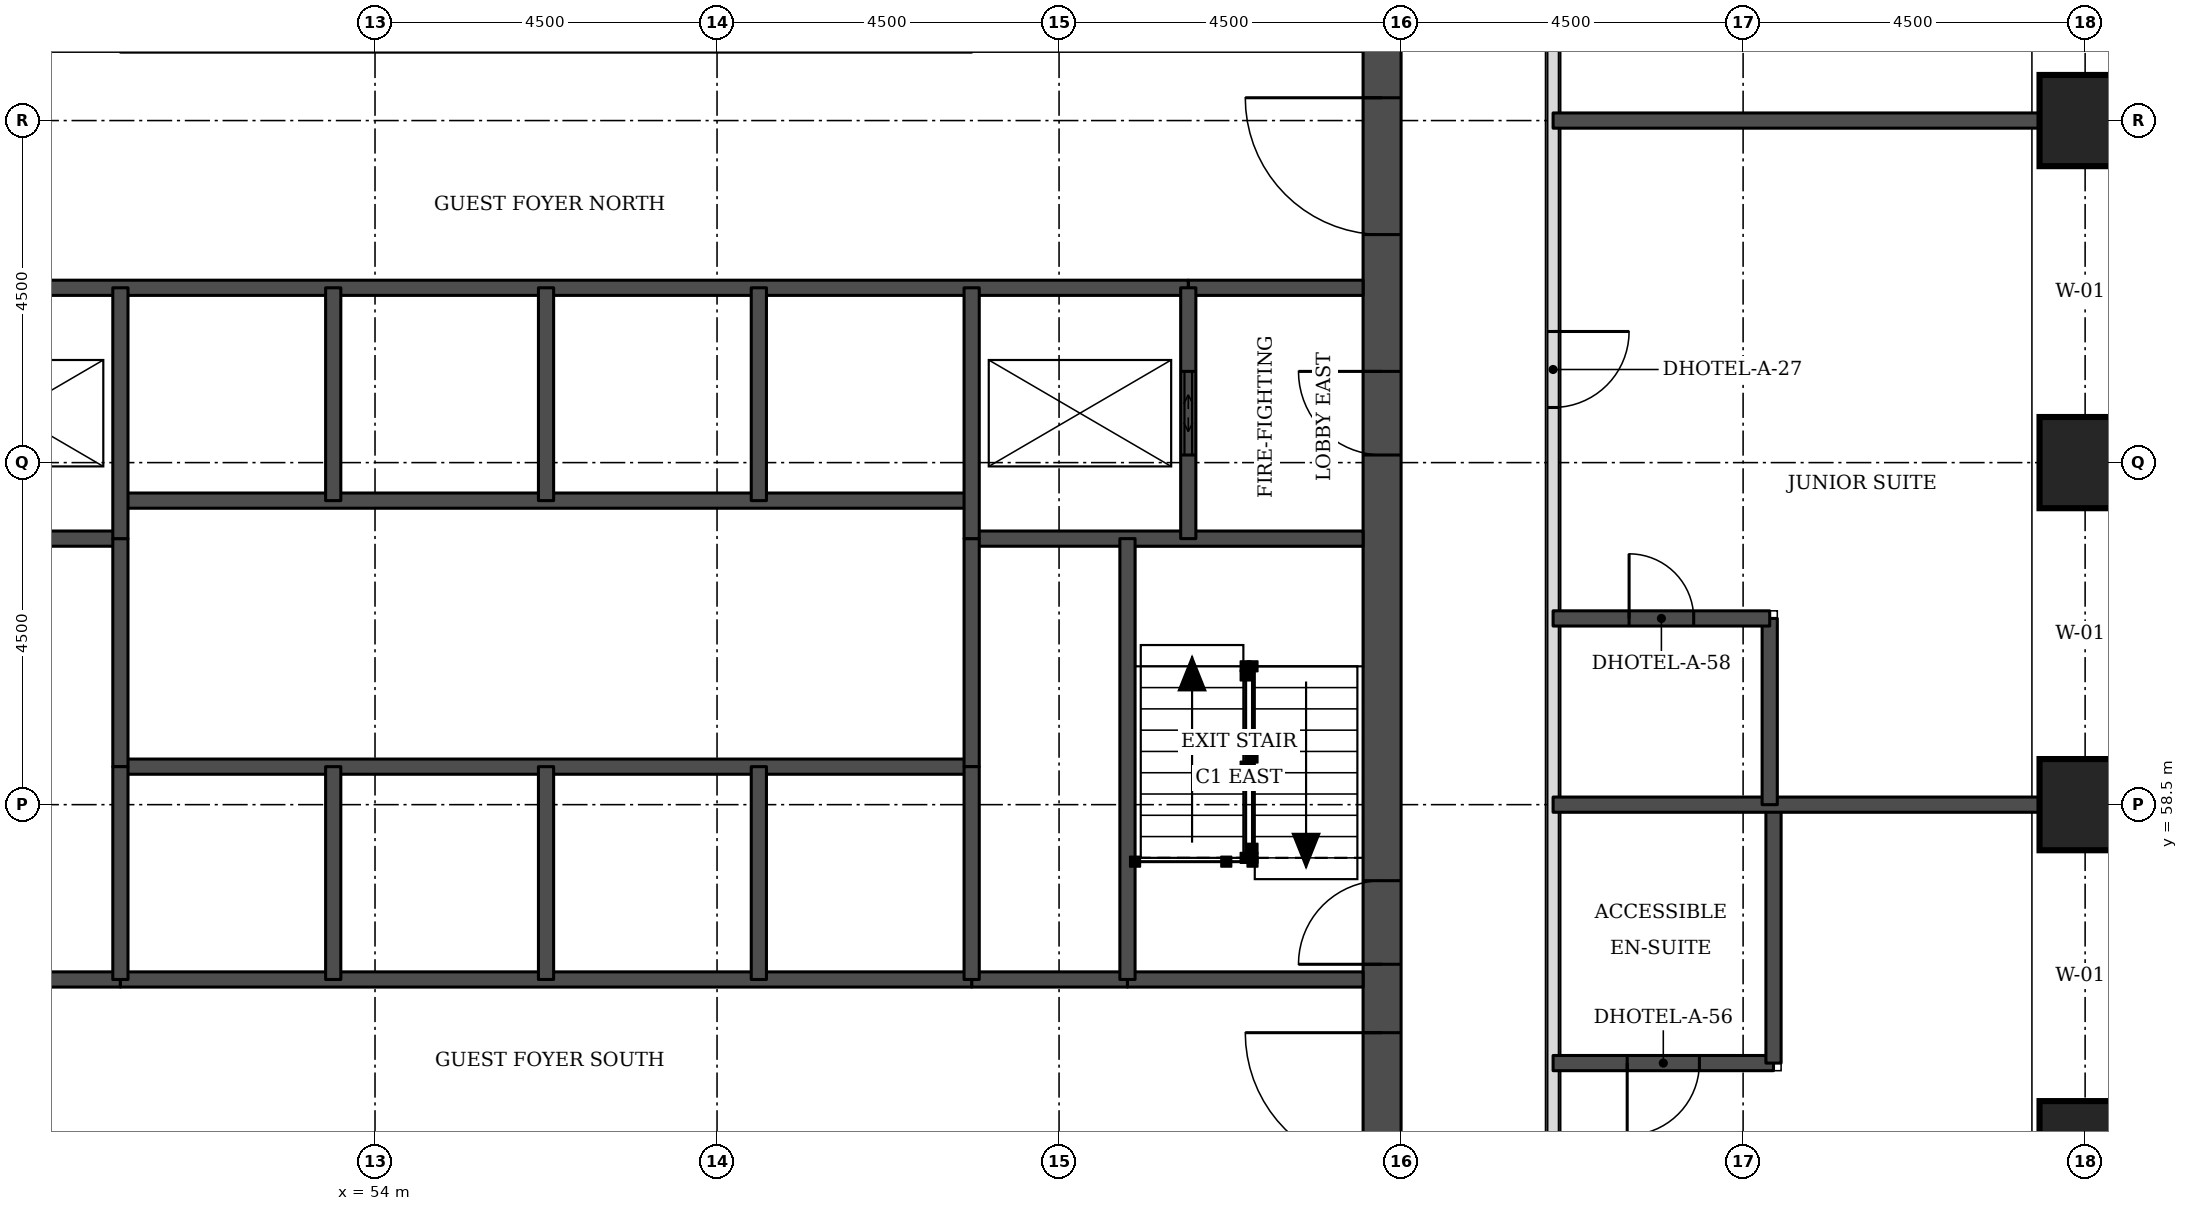
"""IFC4 building model, lengths in metres.
Left out: names, types, materials, properties, quantities, classifications, styles, units other than length and angle.
Written with IfcOpenShell. Run it as: python <this file> out.ifc"""

import sys

from ifc_helpers import new_model, si_unit, direction, frame, frame_2d, origin, origin_2d, place, context, subcontext, project, spatial, rectangle, extrude, element, fill, save


model = new_model("IFC4")
c1 = context("Model", 3, precision=1e-05, world=origin(), true_north=direction((0.0, 1.0)))
c2 = subcontext(c1, "Body", "Model", "MODEL_VIEW")
j1 = project(units=[si_unit("LENGTHUNIT", "METRE"), si_unit("PLANEANGLEUNIT", "RADIAN")], contexts=[c1])
p1 = place(None, origin())
s1 = spatial("IfcSite", under=j1, at=p1, CompositionType="ELEMENT")
p2 = place(p1, origin())
s2 = spatial("IfcBuilding", under=s1, at=p2, CompositionType="ELEMENT")
p3 = place(p2, frame((0.0, 0.0, 49.5)))
s3 = spatial("IfcBuildingStorey", under=s2, at=p3, CompositionType="ELEMENT", Elevation=49.5)
for number, where, z_axis, x_axis in (
    (1, (76.5, 54.0, 0.0), (0.0, 0.0, 1.0), (1.0, 0.0, 0.0)),
    (2, (76.5, 58.5, 0.0), (0.0, 0.0, 1.0), (1.0, 0.0, 0.0)),
    (3, (76.5, 63.0, 0.0), (0.0, 0.0, 1.0), (1.0, 0.0, 0.0)),
    (4, (76.5, 67.5, 0.0), (0.0, 0.0, 1.0), (1.0, 0.0, 0.0)),
):
    element("IfcColumn", number, at=place(p3, frame(where, z_axis=z_axis, x_axis=x_axis)), inside=s3, PredefinedType="COLUMN", context=c2, shape_type="SweptSolid", body=[
        extrude(rectangle(XDim=1.2, YDim=1.2, at=origin_2d()), origin(), (0.0, 0.0, 1.0), 3.3),
    ])
p4 = place(p3, frame((67.25, 49.5, 0.0), z_axis=(0.0, 0.0, 1.0), x_axis=(0.0, 1.0, 0.0)))
e5 = element("IfcWall", 5, at=p4, inside=s3, PredefinedType="SHEAR", context=c2, shape_type="SweptSolid", body=[
    extrude(rectangle(XDim=22.5, YDim=0.5, at=frame_2d((11.25, 0.0))), origin(), (0.0, 0.0, 1.0), 3.3),
])
p5 = place(p4, frame((4.2, 0.0, 0.0)))
e6 = element("IfcOpeningElement", 6, at=p5, cuts=e5, PredefinedType="OPENING", context=c2, shape_type="SweptSolid", body=[
    extrude(rectangle(XDim=1.8, YDim=2.1, at=frame_2d((0.9, 1.05))), frame((0.0, 0.26, 0.0), z_axis=(0.0, -1.0, 0.0), x_axis=(1.0, 0.0, 0.0)), (0.0, 0.0, 1.0), 0.52),
])
p6 = place(p4, frame((6.9, 0.0, 0.0)))
e7 = element("IfcOpeningElement", 7, at=p6, cuts=e5, PredefinedType="OPENING", context=c2, shape_type="SweptSolid", body=[
    extrude(rectangle(XDim=1.1, YDim=2.1, at=frame_2d((0.55, 1.05))), frame((0.0, 0.26, 0.0), z_axis=(0.0, -1.0, 0.0), x_axis=(1.0, 0.0, 0.0)), (0.0, 0.0, 1.0), 0.52),
])
p7 = place(p4, frame((13.6, 0.0, 0.0)))
e8 = element("IfcOpeningElement", 8, at=p7, cuts=e5, PredefinedType="OPENING", context=c2, shape_type="SweptSolid", body=[
    extrude(rectangle(XDim=1.1, YDim=2.1, at=frame_2d((0.55, 1.05))), frame((0.0, 0.26, 0.0), z_axis=(0.0, -1.0, 0.0), x_axis=(1.0, 0.0, 0.0)), (0.0, 0.0, 1.0), 0.52),
])
p8 = place(p4, frame((16.5, 0.0, 0.0)))
e9 = element("IfcOpeningElement", 9, at=p8, cuts=e5, PredefinedType="OPENING", context=c2, shape_type="SweptSolid", body=[
    extrude(rectangle(XDim=1.8, YDim=2.1, at=frame_2d((0.9, 1.05))), frame((0.0, 0.26, 0.0), z_axis=(0.0, -1.0, 0.0), x_axis=(1.0, 0.0, 0.0)), (0.0, 0.0, 1.0), 0.52),
])
p9 = place(p3, frame((69.5, 47.5, 0.0), z_axis=(0.0, 0.0, 1.0), x_axis=(0.0, 1.0, 0.0)))
e10 = element("IfcWall", 10, at=p9, inside=s3, PredefinedType="PARTITIONING", context=c2, shape_type="SweptSolid", body=[
    extrude(rectangle(XDim=26.5, YDim=0.15, at=frame_2d((13.25, 0.0))), origin(), (0.0, 0.0, 1.0), 3.08),
])
p10 = place(p9, frame((22.525, 0.0, 0.0)))
e11 = element("IfcOpeningElement", 11, at=p10, cuts=e10, PredefinedType="OPENING", context=c2, shape_type="SweptSolid", body=[
    extrude(rectangle(XDim=1.0, YDim=2.1, at=frame_2d((0.5, 1.05))), frame((0.0, 0.085, 0.0), z_axis=(0.0, -1.0, 0.0), x_axis=(1.0, 0.0, 0.0)), (0.0, 0.0, 1.0), 0.17),
])
p11 = place(p9, frame((16.225, 0.0, 0.0)))
e12 = element("IfcOpeningElement", 12, at=p11, cuts=e10, PredefinedType="OPENING", context=c2, shape_type="SweptSolid", body=[
    extrude(rectangle(XDim=1.0, YDim=2.1, at=frame_2d((0.5, 1.05))), frame((0.0, 0.085, 0.0), z_axis=(0.0, -1.0, 0.0), x_axis=(1.0, 0.0, 0.0)), (0.0, 0.0, 1.0), 0.17),
])
p12 = place(p9, frame((4.25, 0.0, 0.0)))
e13 = element("IfcOpeningElement", 13, at=p12, cuts=e10, PredefinedType="OPENING", context=c2, shape_type="SweptSolid", body=[
    extrude(rectangle(XDim=1.1, YDim=2.1, at=frame_2d((0.55, 1.05))), frame((0.0, 0.085, 0.0), z_axis=(0.0, -1.0, 0.0), x_axis=(1.0, 0.0, 0.0)), (0.0, 0.0, 1.0), 0.17),
])
p13 = place(p9, frame((0.447, 0.0, 0.0)))
e14 = element("IfcOpeningElement", 14, at=p13, cuts=e10, PredefinedType="OPENING", context=c2, shape_type="SweptSolid", body=[
    extrude(rectangle(XDim=1.0, YDim=2.1, at=frame_2d((0.5, 1.05))), frame((0.0, 0.085, 0.0), z_axis=(0.0, -1.0, 0.0), x_axis=(1.0, 0.0, 0.0)), (0.0, 0.0, 1.0), 0.17),
])
p14 = place(p3, frame((69.5, 55.1, 0.0), z_axis=(0.0, 0.0, 1.0), x_axis=(1.0, 0.0, 0.0)))
e15 = element("IfcWall", 15, at=p14, inside=s3, PredefinedType="SOLIDWALL", context=c2, shape_type="SweptSolid", body=[
    extrude(rectangle(XDim=2.9, YDim=0.2, at=frame_2d((1.45, 0.0))), origin(), (0.0, 0.0, 1.0), 3.08),
])
p15 = place(p14, frame((0.975, 0.0, 0.0)))
e16 = element("IfcOpeningElement", 16, at=p15, cuts=e15, PredefinedType="OPENING", context=c2, shape_type="SweptSolid", body=[
    extrude(rectangle(XDim=0.95, YDim=2.1, at=frame_2d((0.475, 1.05))), frame((0.0, 0.11, 0.0), z_axis=(0.0, -1.0, 0.0), x_axis=(1.0, 0.0, 0.0)), (0.0, 0.0, 1.0), 0.22),
])
p16 = place(p3, frame((72.4, 55.1, 0.0), z_axis=(0.0, 0.0, 1.0), x_axis=(0.0, 1.0, 0.0)))
e17 = element("IfcWall", 17, at=p16, inside=s3, PredefinedType="SOLIDWALL", context=c2, shape_type="SweptSolid", body=[
    extrude(rectangle(XDim=3.4, YDim=0.2, at=frame_2d((1.7, 0.0))), origin(), (0.0, 0.0, 1.0), 3.08),
])
p17 = place(p3, frame((69.5, 58.5, 0.0), z_axis=(0.0, 0.0, 1.0), x_axis=(1.0, 0.0, 0.0)))
e18 = element("IfcWall", 18, at=p17, inside=s3, PredefinedType="SOLIDWALL", context=c2, shape_type="SweptSolid", body=[
    extrude(rectangle(XDim=6.4, YDim=0.2, at=frame_2d((3.2, 0.0))), origin(), (0.0, 0.0, 1.0), 3.08),
])
p18 = place(p3, frame((72.35, 58.5, 0.0), z_axis=(0.0, 0.0, 1.0), x_axis=(0.0, 1.0, 0.0)))
e19 = element("IfcWall", 19, at=p18, inside=s3, PredefinedType="SOLIDWALL", context=c2, shape_type="SweptSolid", body=[
    extrude(rectangle(XDim=2.45, YDim=0.2, at=frame_2d((1.225, 0.0))), origin(), (0.0, 0.0, 1.0), 3.08),
])
p19 = place(p3, frame((69.5, 60.95, 0.0), z_axis=(0.0, 0.0, 1.0), x_axis=(1.0, 0.0, 0.0)))
e20 = element("IfcWall", 20, at=p19, inside=s3, PredefinedType="SOLIDWALL", context=c2, shape_type="SweptSolid", body=[
    extrude(rectangle(XDim=2.85, YDim=0.2, at=frame_2d((1.425, 0.0))), origin(), (0.0, 0.0, 1.0), 3.08),
])
p20 = place(p19, frame((1.0, 0.0, 0.0)))
e21 = element("IfcOpeningElement", 21, at=p20, cuts=e20, PredefinedType="OPENING", context=c2, shape_type="SweptSolid", body=[
    extrude(rectangle(XDim=0.85, YDim=2.1, at=frame_2d((0.425, 1.05))), frame((0.0, 0.11, 0.0), z_axis=(0.0, -1.0, 0.0), x_axis=(1.0, 0.0, 0.0)), (0.0, 0.0, 1.0), 0.22),
])
p21 = place(p3, frame((69.5, 67.5, 0.0), z_axis=(0.0, 0.0, 1.0), x_axis=(1.0, 0.0, 0.0)))
e22 = element("IfcWall", 22, at=p21, inside=s3, PredefinedType="SOLIDWALL", context=c2, shape_type="SweptSolid", body=[
    extrude(rectangle(XDim=6.4, YDim=0.2, at=frame_2d((3.2, 0.0))), origin(), (0.0, 0.0, 1.0), 3.08),
])
for number, where, z_axis, x_axis in (
    (23, (48.6, 56.2, 0.0), (0.0, 0.0, 1.0), (1.0, 0.0, 0.0)),
    (24, (61.85, 56.2, 0.0), (0.0, 0.0, 1.0), (1.0, 0.0, 0.0)),
):
    element("IfcWall", number, at=place(p3, frame(where, z_axis=z_axis, x_axis=x_axis)), inside=s3, PredefinedType="SOLIDWALL", context=c2, shape_type="SweptSolid", body=[
        extrude(rectangle(XDim=2.05, YDim=0.2, at=frame_2d((1.025, 0.0))), origin(), (0.0, 0.0, 1.0), 3.08),
    ])
p22 = place(p3, frame((50.65, 56.2, 0.0), z_axis=(0.0, 0.0, 1.0), x_axis=(1.0, 0.0, 0.0)))
e25 = element("IfcWall", 25, at=p22, inside=s3, PredefinedType="SOLIDWALL", context=c2, shape_type="SweptSolid", body=[
    extrude(rectangle(XDim=11.2, YDim=0.2, at=frame_2d((5.6, 0.0))), origin(), (0.0, 0.0, 1.0), 3.08),
])
p23 = place(p3, frame((63.9, 56.2, 0.0), z_axis=(0.0, 0.0, 1.0), x_axis=(1.0, 0.0, 0.0)))
e26 = element("IfcWall", 26, at=p23, inside=s3, PredefinedType="SOLIDWALL", context=c2, shape_type="SweptSolid", body=[
    extrude(rectangle(XDim=3.1, YDim=0.2, at=frame_2d((1.55, 0.0))), origin(), (0.0, 0.0, 1.0), 3.08),
])
p24 = place(p3, frame((50.65, 59.0, 0.0), z_axis=(0.0, 0.0, 1.0), x_axis=(1.0, 0.0, 0.0)))
e27 = element("IfcWall", 27, at=p24, inside=s3, PredefinedType="SOLIDWALL", context=c2, shape_type="SweptSolid", body=[
    extrude(rectangle(XDim=11.2, YDim=0.2, at=frame_2d((5.6, 0.0))), origin(), (0.0, 0.0, 1.0), 3.3),
])
for number, where, z_axis, x_axis in (
    (28, (45.5, 62.0, 0.0), (0.0, 0.0, 1.0), (1.0, 0.0, 0.0)),
    (29, (61.85, 62.0, 0.0), (0.0, 0.0, 1.0), (1.0, 0.0, 0.0)),
):
    element("IfcWall", number, at=place(p3, frame(where, z_axis=z_axis, x_axis=x_axis)), inside=s3, PredefinedType="SOLIDWALL", context=c2, shape_type="SweptSolid", body=[
        extrude(rectangle(XDim=5.15, YDim=0.2, at=frame_2d((2.575, 0.0))), origin(), (0.0, 0.0, 1.0), 3.08),
    ])
p25 = place(p3, frame((50.65, 62.5, 0.0), z_axis=(0.0, 0.0, 1.0), x_axis=(1.0, 0.0, 0.0)))
e30 = element("IfcWall", 30, at=p25, inside=s3, PredefinedType="SOLIDWALL", context=c2, shape_type="SweptSolid", body=[
    extrude(rectangle(XDim=11.2, YDim=0.2, at=frame_2d((5.6, 0.0))), origin(), (0.0, 0.0, 1.0), 3.3),
])
p26 = place(p3, frame((64.7, 65.3, 0.0), z_axis=(0.0, 0.0, 1.0), x_axis=(1.0, 0.0, 0.0)))
e31 = element("IfcWall", 31, at=p26, inside=s3, PredefinedType="SOLIDWALL", context=c2, shape_type="SweptSolid", body=[
    extrude(rectangle(XDim=2.3, YDim=0.2, at=frame_2d((1.15, 0.0))), origin(), (0.0, 0.0, 1.0), 3.08),
])
p27 = place(p3, frame((47.8, 65.3, 0.0), z_axis=(0.0, 0.0, 1.0), x_axis=(1.0, 0.0, 0.0)))
e32 = element("IfcWall", 32, at=p27, inside=s3, PredefinedType="SOLIDWALL", context=c2, shape_type="SweptSolid", body=[
    extrude(rectangle(XDim=16.9, YDim=0.2, at=frame_2d((8.45, 0.0))), origin(), (0.0, 0.0, 1.0), 3.08),
])
p28 = place(p3, frame((50.65, 59.0, 0.0), z_axis=(0.0, 0.0, 1.0), x_axis=(0.0, 1.0, 0.0)))
e33 = element("IfcWall", 33, at=p28, inside=s3, PredefinedType="SOLIDWALL", context=c2, shape_type="SweptSolid", body=[
    extrude(rectangle(XDim=3.0, YDim=0.2, at=frame_2d((1.5, 0.0))), origin(), (0.0, 0.0, 1.0), 3.3),
])
p29 = place(p3, frame((50.65, 56.2, 0.0), z_axis=(0.0, 0.0, 1.0), x_axis=(0.0, 1.0, 0.0)))
e34 = element("IfcWall", 34, at=p29, inside=s3, PredefinedType="SOLIDWALL", context=c2, shape_type="SweptSolid", body=[
    extrude(rectangle(XDim=2.8, YDim=0.2, at=frame_2d((1.4, 0.0))), origin(), (0.0, 0.0, 1.0), 3.08),
])
p30 = place(p3, frame((50.65, 62.0, 0.0), z_axis=(0.0, 0.0, 1.0), x_axis=(0.0, 1.0, 0.0)))
e35 = element("IfcWall", 35, at=p30, inside=s3, PredefinedType="SOLIDWALL", context=c2, shape_type="SweptSolid", body=[
    extrude(rectangle(XDim=3.3, YDim=0.2, at=frame_2d((1.65, 0.0))), origin(), (0.0, 0.0, 1.0), 3.08),
])
for number, where, z_axis, x_axis in (
    (36, (53.45, 56.2, 0.0), (0.0, 0.0, 1.0), (0.0, 1.0, 0.0)),
    (37, (53.45, 62.5, 0.0), (0.0, 0.0, 1.0), (0.0, 1.0, 0.0)),
    (38, (56.25, 56.2, 0.0), (0.0, 0.0, 1.0), (0.0, 1.0, 0.0)),
    (39, (56.25, 62.5, 0.0), (0.0, 0.0, 1.0), (0.0, 1.0, 0.0)),
    (40, (59.05, 56.2, 0.0), (0.0, 0.0, 1.0), (0.0, 1.0, 0.0)),
    (41, (59.05, 62.5, 0.0), (0.0, 0.0, 1.0), (0.0, 1.0, 0.0)),
):
    element("IfcWall", number, at=place(p3, frame(where, z_axis=z_axis, x_axis=x_axis)), inside=s3, PredefinedType="SOLIDWALL", context=c2, shape_type="SweptSolid", body=[
        extrude(rectangle(XDim=2.8, YDim=0.2, at=frame_2d((1.4, 0.0))), origin(), (0.0, 0.0, 1.0), 3.08),
    ])
p31 = place(p3, frame((61.85, 59.0, 0.0), z_axis=(0.0, 0.0, 1.0), x_axis=(0.0, 1.0, 0.0)))
e42 = element("IfcWall", 42, at=p31, inside=s3, PredefinedType="SOLIDWALL", context=c2, shape_type="SweptSolid", body=[
    extrude(rectangle(XDim=3.0, YDim=0.2, at=frame_2d((1.5, 0.0))), origin(), (0.0, 0.0, 1.0), 3.3),
])
p32 = place(p3, frame((61.85, 56.2, 0.0), z_axis=(0.0, 0.0, 1.0), x_axis=(0.0, 1.0, 0.0)))
e43 = element("IfcWall", 43, at=p32, inside=s3, PredefinedType="SOLIDWALL", context=c2, shape_type="SweptSolid", body=[
    extrude(rectangle(XDim=2.8, YDim=0.2, at=frame_2d((1.4, 0.0))), origin(), (0.0, 0.0, 1.0), 3.08),
])
p33 = place(p3, frame((61.85, 62.0, 0.0), z_axis=(0.0, 0.0, 1.0), x_axis=(0.0, 1.0, 0.0)))
e44 = element("IfcWall", 44, at=p33, inside=s3, PredefinedType="SOLIDWALL", context=c2, shape_type="SweptSolid", body=[
    extrude(rectangle(XDim=3.3, YDim=0.2, at=frame_2d((1.65, 0.0))), origin(), (0.0, 0.0, 1.0), 3.08),
])
p34 = place(p3, frame((63.9, 56.2, 0.0), z_axis=(0.0, 0.0, 1.0), x_axis=(0.0, 1.0, 0.0)))
e45 = element("IfcWall", 45, at=p34, inside=s3, PredefinedType="SOLIDWALL", context=c2, shape_type="SweptSolid", body=[
    extrude(rectangle(XDim=5.8, YDim=0.2, at=frame_2d((2.9, 0.0))), origin(), (0.0, 0.0, 1.0), 3.08),
])
p35 = place(p3, frame((64.7, 62.0, 0.0), z_axis=(0.0, 0.0, 1.0), x_axis=(0.0, 1.0, 0.0)))
e46 = element("IfcWall", 46, at=p35, inside=s3, PredefinedType="SOLIDWALL", context=c2, shape_type="SweptSolid", body=[
    extrude(rectangle(XDim=3.3, YDim=0.2, at=frame_2d((1.65, 0.0))), origin(), (0.0, 0.0, 1.0), 3.08),
])
p36 = place(p35, frame((1.1, 0.0, 0.0)))
e47 = element("IfcOpeningElement", 47, at=p36, cuts=e46, PredefinedType="OPENING", context=c2, shape_type="SweptSolid", body=[
    extrude(rectangle(XDim=1.1, YDim=2.1, at=frame_2d((0.55, 1.05))), frame((0.0, 0.11, 0.0), z_axis=(0.0, -1.0, 0.0), x_axis=(1.0, 0.0, 0.0)), (0.0, 0.0, 1.0), 0.22),
])
p37 = place(p11, frame((1.0, 0.0, 0.0), z_axis=(0.0, 0.0, 1.0), x_axis=(-1.0, 0.0, 0.0)))
e48 = element("IfcDoor", 48, at=p37, inside=s3, OperationType="SINGLE_SWING_LEFT", PredefinedType="DOOR", context=c2, shape_type="SweptSolid", body=[
    extrude(rectangle(XDim=1.0, YDim=2.1, at=frame_2d((0.5, 1.05))), frame((0.0, 0.025, 0.0), z_axis=(0.0, -1.0, 0.0), x_axis=(1.0, 0.0, 0.0)), (0.0, 0.0, 1.0), 0.05),
])
fill(e12, e48)
p38 = place(p20, origin())
e49 = element("IfcDoor", 49, at=p38, inside=s3, OperationType="SINGLE_SWING_LEFT", PredefinedType="DOOR", context=c2, shape_type="SweptSolid", body=[
    extrude(rectangle(XDim=0.85, YDim=2.1, at=frame_2d((0.425, 1.05))), frame((0.0, 0.025, 0.0), z_axis=(0.0, -1.0, 0.0), x_axis=(1.0, 0.0, 0.0)), (0.0, 0.0, 1.0), 0.05),
])
fill(e21, e49)
p39 = place(p15, frame((0.95, 0.0, 0.0), z_axis=(0.0, 0.0, 1.0), x_axis=(-1.0, 0.0, 0.0)))
e50 = element("IfcDoor", 50, at=p39, inside=s3, OperationType="SINGLE_SWING_RIGHT", PredefinedType="DOOR", context=c2, shape_type="SweptSolid", body=[
    extrude(rectangle(XDim=0.95, YDim=2.1, at=frame_2d((0.475, 1.05))), frame((0.0, 0.025, 0.0), z_axis=(0.0, -1.0, 0.0), x_axis=(1.0, 0.0, 0.0)), (0.0, 0.0, 1.0), 0.05),
])
fill(e16, e50)
p40 = place(p36, origin())
e51 = element("IfcDoor", 51, at=p40, inside=s3, OperationType="DOUBLE_DOOR_SLIDING", PredefinedType="DOOR", context=c2, shape_type="SweptSolid", body=[
    extrude(rectangle(XDim=1.1, YDim=2.1, at=frame_2d((0.55, 1.05))), frame((0.0, 0.025, 0.0), z_axis=(0.0, -1.0, 0.0), x_axis=(1.0, 0.0, 0.0)), (0.0, 0.0, 1.0), 0.05),
])
fill(e47, e51)
p41 = place(p5, origin())
e52 = element("IfcDoor", 52, at=p41, inside=s3, OperationType="SINGLE_SWING_RIGHT", PredefinedType="DOOR", context=c2, shape_type="SweptSolid", body=[
    extrude(rectangle(XDim=1.8, YDim=2.1, at=frame_2d((0.9, 1.05))), frame((0.0, 0.025, 0.0), z_axis=(0.0, -1.0, 0.0), x_axis=(1.0, 0.0, 0.0)), (0.0, 0.0, 1.0), 0.05),
])
fill(e6, e52)
p42 = place(p6, origin())
e53 = element("IfcDoor", 53, at=p42, inside=s3, OperationType="SINGLE_SWING_LEFT", PredefinedType="DOOR", context=c2, shape_type="SweptSolid", body=[
    extrude(rectangle(XDim=1.1, YDim=2.1, at=frame_2d((0.55, 1.05))), frame((0.0, 0.025, 0.0), z_axis=(0.0, -1.0, 0.0), x_axis=(1.0, 0.0, 0.0)), (0.0, 0.0, 1.0), 0.05),
])
fill(e7, e53)
p43 = place(p7, origin())
e54 = element("IfcDoor", 54, at=p43, inside=s3, OperationType="SINGLE_SWING_RIGHT", PredefinedType="DOOR", context=c2, shape_type="SweptSolid", body=[
    extrude(rectangle(XDim=1.1, YDim=2.1, at=frame_2d((0.55, 1.05))), frame((0.0, 0.025, 0.0), z_axis=(0.0, -1.0, 0.0), x_axis=(1.0, 0.0, 0.0)), (0.0, 0.0, 1.0), 0.05),
])
fill(e8, e54)
p44 = place(p8, origin())
e55 = element("IfcDoor", 55, at=p44, inside=s3, OperationType="SINGLE_SWING_RIGHT", PredefinedType="DOOR", context=c2, shape_type="SweptSolid", body=[
    extrude(rectangle(XDim=1.8, YDim=2.1, at=frame_2d((0.9, 1.05))), frame((0.0, 0.025, 0.0), z_axis=(0.0, -1.0, 0.0), x_axis=(1.0, 0.0, 0.0)), (0.0, 0.0, 1.0), 0.05),
])
fill(e9, e55)
save(model, sys.argv[1])
